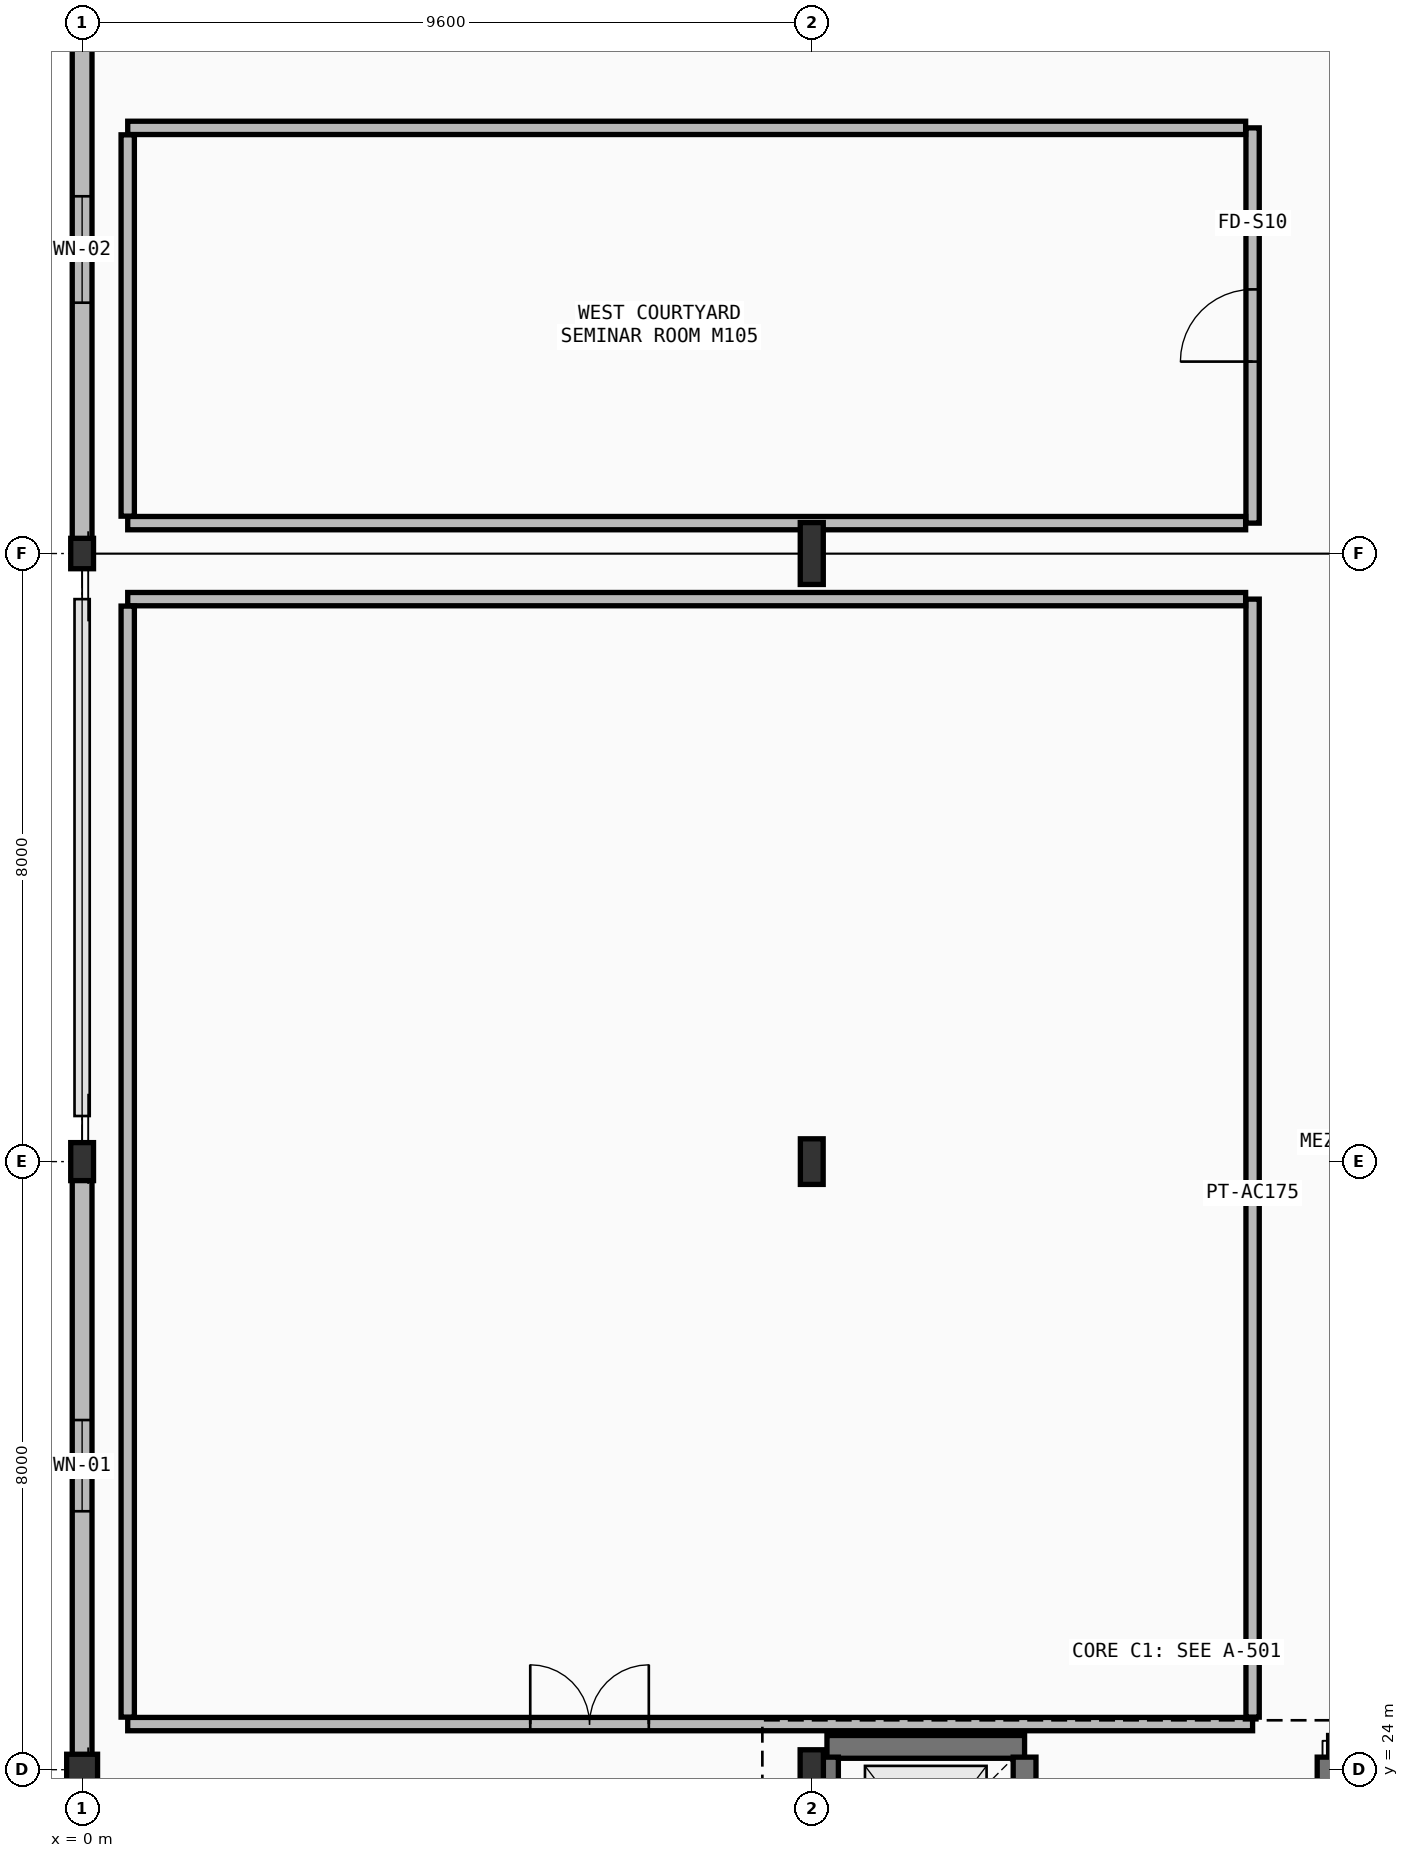
"""IFC4 building model, lengths in metres.
Left out: names, types, materials, properties, quantities, classifications, styles, units other than length and angle.
Written with IfcOpenShell. Run it as: python <this file> out.ifc"""

import sys

from ifc_helpers import new_model, si_unit, direction, frame, frame_2d, origin, origin_2d, place, context, subcontext, project, spatial, rectangle, hollow_circle, i_section, extrude, element, fill, save


model = new_model("IFC4")
c1 = context("Model", 3, precision=1e-05, world=origin(), true_north=direction((0.0, 1.0)))
c2 = subcontext(c1, "Body", "Model", "MODEL_VIEW")
j1 = project(units=[si_unit("LENGTHUNIT", "METRE"), si_unit("PLANEANGLEUNIT", "RADIAN")], contexts=[c1])
p1 = place(None, origin())
s1 = spatial("IfcSite", under=j1, at=p1, CompositionType="ELEMENT")
p2 = place(p1, origin())
s2 = spatial("IfcBuilding", under=s1, at=p2, CompositionType="ELEMENT")
p3 = place(p2, frame((0.0, 0.0, 6.0)))
s3 = spatial("IfcBuildingStorey", under=s2, at=p3, CompositionType="ELEMENT", Elevation=6.0)
p4 = place(p3, frame((0.0, 24.0, 0.0), z_axis=(0.0, 0.0, 1.0), x_axis=(1.0, 0.0, 0.0)))
e1 = element("IfcColumn", 1, at=p4, inside=s3, PredefinedType="COLUMN", context=c2, shape_type="SweptSolid", body=[
    extrude(hollow_circle(Radius=0.203, WallThickness=0.02, at=origin_2d()), origin(), (0.0, 0.0, 1.0), 5.4),
])
p5 = place(p3, frame((0.0, 32.0, 0.0), z_axis=(0.0, 0.0, 1.0), x_axis=(1.0, 0.0, 0.0)))
e2 = element("IfcColumn", 2, at=p5, inside=s3, PredefinedType="COLUMN", context=c2, shape_type="SweptSolid", body=[
    extrude(i_section(OverallWidth=0.3, OverallDepth=0.5, WebThickness=0.014, FlangeThickness=0.028, FilletRadius=0.027, at=origin_2d()), origin(), (0.0, 0.0, 1.0), 5.4),
])
p6 = place(p3, frame((0.0, 40.0, 0.0), z_axis=(0.0, 0.0, 1.0), x_axis=(1.0, 0.0, 0.0)))
e3 = element("IfcColumn", 3, at=p6, inside=s3, PredefinedType="COLUMN", context=c2, shape_type="SweptSolid", body=[
    extrude(i_section(OverallWidth=0.3, OverallDepth=0.4, WebThickness=0.013, FlangeThickness=0.024, FilletRadius=0.027, at=origin_2d()), origin(), (0.0, 0.0, 1.0), 5.4),
])
p7 = place(p3, frame((9.6, 24.0, 0.0), z_axis=(0.0, 0.0, 1.0), x_axis=(1.0, 0.0, 0.0)))
e4 = element("IfcColumn", 4, at=p7, inside=s3, PredefinedType="COLUMN", context=c2, shape_type="SweptSolid", body=[
    extrude(i_section(OverallWidth=0.306, OverallDepth=0.524, WebThickness=0.021, FlangeThickness=0.04, FilletRadius=0.027, at=origin_2d()), origin(), (0.0, 0.0, 1.0), 5.4),
])
p8 = place(p3, frame((9.6, 32.0, 0.0), z_axis=(0.0, 0.0, 1.0), x_axis=(1.0, 0.0, 0.0)))
e5 = element("IfcColumn", 5, at=p8, inside=s3, PredefinedType="COLUMN", context=c2, shape_type="SweptSolid", body=[
    extrude(i_section(OverallWidth=0.3, OverallDepth=0.6, WebThickness=0.015, FlangeThickness=0.03, FilletRadius=0.027, at=origin_2d()), origin(), (0.0, 0.0, 1.0), 5.4),
])
p9 = place(p3, frame((9.6, 40.0, 0.0), z_axis=(0.0, 0.0, 1.0), x_axis=(1.0, 0.0, 0.0)))
e6 = element("IfcColumn", 6, at=p9, inside=s3, PredefinedType="COLUMN", context=c2, shape_type="SweptSolid", body=[
    extrude(i_section(OverallWidth=0.303, OverallDepth=0.814, WebThickness=0.021, FlangeThickness=0.04, FilletRadius=0.03, at=origin_2d()), origin(), (0.0, 0.0, 1.0), 5.4),
])
p10 = place(p3, frame((0.0, 24.0, 0.0), z_axis=(0.0, 0.0, 1.0), x_axis=(0.0, 1.0, 0.0)))
e7 = element("IfcWall", 7, at=p10, inside=s3, PredefinedType="STANDARD", context=c2, shape_type="SweptSolid", body=[
    extrude(rectangle(XDim=8.0, YDim=0.26, at=frame_2d((4.0, 0.0))), origin(), (0.0, 0.0, 1.0), 4.67),
])
p11 = place(p10, frame((3.4, 0.0, 0.9)))
e8 = element("IfcOpeningElement", 8, at=p11, cuts=e7, PredefinedType="OPENING", context=c2, shape_type="SweptSolid", body=[
    extrude(rectangle(XDim=1.2, YDim=1.8, at=frame_2d((0.6, 0.9))), frame((0.0, 0.14, 0.0), z_axis=(0.0, -1.0, 0.0), x_axis=(1.0, 0.0, 0.0)), (0.0, 0.0, 1.0), 0.28),
])
p12 = place(p3, frame((0.0, 40.0, 0.0), z_axis=(0.0, 0.0, 1.0), x_axis=(0.0, 1.0, 0.0)))
e9 = element("IfcWall", 9, at=p12, inside=s3, PredefinedType="STANDARD", context=c2, shape_type="SweptSolid", body=[
    extrude(rectangle(XDim=8.0, YDim=0.26, at=frame_2d((4.0, 0.0))), origin(), (0.0, 0.0, 1.0), 4.69),
])
p13 = place(p12, frame((3.3, 0.0, 0.9)))
e10 = element("IfcOpeningElement", 10, at=p13, cuts=e9, PredefinedType="OPENING", context=c2, shape_type="SweptSolid", body=[
    extrude(rectangle(XDim=1.4, YDim=1.9, at=frame_2d((0.7, 0.95))), frame((0.0, 0.14, 0.0), z_axis=(0.0, -1.0, 0.0), x_axis=(1.0, 0.0, 0.0)), (0.0, 0.0, 1.0), 0.28),
])
p14 = place(p3, frame((12.4, 24.3, 0.0), z_axis=(0.0, 0.0, 1.0), x_axis=(-1.0, 0.0, 0.0)))
e11 = element("IfcWall", 11, at=p14, inside=s3, PredefinedType="SHEAR", context=c2, shape_type="SweptSolid", body=[
    extrude(rectangle(XDim=2.6, YDim=0.3, at=frame_2d((1.3, 0.0))), origin(), (0.0, 0.0, 1.0), 5.15),
])
p15 = place(p3, frame((12.4, 21.665, 0.0), z_axis=(0.0, 0.0, 1.0), x_axis=(0.0, 1.0, 0.0)))
e12 = element("IfcWall", 12, at=p15, inside=s3, PredefinedType="SHEAR", context=c2, shape_type="SweptSolid", body=[
    extrude(rectangle(XDim=2.5, YDim=0.3, at=frame_2d((1.25, 0.0))), origin(), (0.0, 0.0, 1.0), 5.15),
])
p16 = place(p15, frame((0.55, 0.0, 0.0)))
e13 = element("IfcOpeningElement", 13, at=p16, cuts=e12, PredefinedType="OPENING", context=c2, shape_type="SweptSolid", body=[
    extrude(rectangle(XDim=1.4, YDim=2.26, at=frame_2d((0.7, 1.13))), frame((0.0, 0.16, 0.0), z_axis=(0.0, -1.0, 0.0), x_axis=(1.0, 0.0, 0.0)), (0.0, 0.0, 1.0), 0.32),
])
p17 = place(p3, frame((9.8, 24.165, 0.0), z_axis=(0.0, 0.0, 1.0), x_axis=(0.0, -1.0, 0.0)))
e14 = element("IfcWall", 14, at=p17, inside=s3, PredefinedType="SHEAR", context=c2, shape_type="SweptSolid", body=[
    extrude(rectangle(XDim=2.33, YDim=0.3, at=frame_2d((1.165, 0.0))), origin(), (0.0, 0.0, 1.0), 5.15),
])
p18 = place(p3, frame((16.4, 24.165, 0.0), z_axis=(0.0, 0.0, 1.0), x_axis=(0.0, -1.0, 0.0)))
e15 = element("IfcWall", 15, at=p18, inside=s3, PredefinedType="SHEAR", context=c2, shape_type="SweptSolid", body=[
    extrude(rectangle(XDim=2.5, YDim=0.3, at=frame_2d((1.25, 0.0))), origin(), (0.0, 0.0, 1.0), 5.15),
])
p19 = place(p18, frame((0.65, 0.0, 0.0)))
e16 = element("IfcOpeningElement", 16, at=p19, cuts=e15, PredefinedType="OPENING", context=c2, shape_type="SweptSolid", body=[
    extrude(rectangle(XDim=1.2, YDim=2.2, at=frame_2d((0.6, 1.1))), frame((0.0, 0.16, 0.0), z_axis=(0.0, -1.0, 0.0), x_axis=(1.0, 0.0, 0.0)), (0.0, 0.0, 1.0), 0.32),
])
p20 = place(p3, frame((0.6, 24.6, 0.0), z_axis=(0.0, 0.0, 1.0), x_axis=(1.0, 0.0, 0.0)))
e17 = element("IfcWall", 17, at=p20, inside=s3, PredefinedType="PARTITIONING", context=c2, shape_type="SweptSolid", body=[
    extrude(rectangle(XDim=14.8, YDim=0.175, at=frame_2d((7.4, 0.0))), origin(), (0.0, 0.0, 1.0), 4.42),
])
p21 = place(p20, frame((5.296, 0.0, 0.0)))
e18 = element("IfcOpeningElement", 18, at=p21, cuts=e17, PredefinedType="OPENING", context=c2, shape_type="SweptSolid", body=[
    extrude(rectangle(XDim=1.56, YDim=2.18, at=frame_2d((0.78, 1.09))), frame((0.0, 0.097, 0.0), z_axis=(0.0, -1.0, 0.0), x_axis=(1.0, 0.0, 0.0)), (0.0, 0.0, 1.0), 0.195),
])
p22 = place(p3, frame((15.4, 24.691, 0.0), z_axis=(0.0, 0.0, 1.0), x_axis=(0.0, 1.0, 0.0)))
e19 = element("IfcWall", 19, at=p22, inside=s3, PredefinedType="PARTITIONING", context=c2, shape_type="SweptSolid", body=[
    extrude(rectangle(XDim=14.708, YDim=0.175, at=frame_2d((7.354, 0.0))), origin(), (0.0, 0.0, 1.0), 4.73),
])
p23 = place(p3, frame((15.309, 39.4, 0.0), z_axis=(0.0, 0.0, 1.0), x_axis=(-1.0, 0.0, 0.0)))
e20 = element("IfcWall", 20, at=p23, inside=s3, PredefinedType="PARTITIONING", context=c2, shape_type="SweptSolid", body=[
    extrude(rectangle(XDim=14.708, YDim=0.175, at=frame_2d((7.354, 0.0))), origin(), (0.0, 0.0, 1.0), 4.52),
])
p24 = place(p3, frame((0.6, 39.309, 0.0), z_axis=(0.0, 0.0, 1.0), x_axis=(0.0, -1.0, 0.0)))
e21 = element("IfcWall", 21, at=p24, inside=s3, PredefinedType="PARTITIONING", context=c2, shape_type="SweptSolid", body=[
    extrude(rectangle(XDim=14.617, YDim=0.175, at=frame_2d((7.309, 0.0))), origin(), (0.0, 0.0, 1.0), 4.63),
])
p25 = place(p3, frame((15.4, 40.4, 0.0), z_axis=(0.0, 0.0, 1.0), x_axis=(0.0, 1.0, 0.0)))
e22 = element("IfcWall", 22, at=p25, inside=s3, PredefinedType="PARTITIONING", context=c2, shape_type="SweptSolid", body=[
    extrude(rectangle(XDim=5.2, YDim=0.175, at=frame_2d((2.6, 0.0))), origin(), (0.0, 0.0, 1.0), 5.17),
])
p26 = place(p25, frame((2.125, 0.0, 0.0)))
e23 = element("IfcOpeningElement", 23, at=p26, cuts=e22, PredefinedType="OPENING", context=c2, shape_type="SweptSolid", body=[
    extrude(rectangle(XDim=0.95, YDim=2.18, at=frame_2d((0.475, 1.09))), frame((0.0, 0.097, 0.0), z_axis=(0.0, -1.0, 0.0), x_axis=(1.0, 0.0, 0.0)), (0.0, 0.0, 1.0), 0.195),
])
for number, where, z_axis, x_axis in (
    (24, (0.6, 40.4, 0.0), (0.0, 0.0, 1.0), (1.0, 0.0, 0.0)),
    (25, (15.309, 45.6, 0.0), (0.0, 0.0, 1.0), (-1.0, 0.0, 0.0)),
):
    element("IfcWall", number, at=place(p3, frame(where, z_axis=z_axis, x_axis=x_axis)), inside=s3, PredefinedType="PARTITIONING", context=c2, shape_type="SweptSolid", body=[
        extrude(rectangle(XDim=14.708, YDim=0.175, at=frame_2d((7.354, 0.0))), origin(), (0.0, 0.0, 1.0), 4.64),
    ])
p27 = place(p3, frame((0.6, 45.509, 0.0), z_axis=(0.0, 0.0, 1.0), x_axis=(0.0, -1.0, 0.0)))
e26 = element("IfcWall", 26, at=p27, inside=s3, PredefinedType="PARTITIONING", context=c2, shape_type="SweptSolid", body=[
    extrude(rectangle(XDim=5.017, YDim=0.175, at=frame_2d((2.509, 0.0))), origin(), (0.0, 0.0, 1.0), 5.17),
])
p28 = place(p11, origin())
e27 = element("IfcWindow", 27, at=p28, inside=s3, PartitioningType="SINGLE_PANEL", PredefinedType="WINDOW", context=c2, shape_type="SweptSolid", body=[
    extrude(rectangle(XDim=1.2, YDim=1.8, at=frame_2d((0.6, 0.9))), frame((0.0, 0.03, 0.0), z_axis=(0.0, -1.0, 0.0), x_axis=(1.0, 0.0, 0.0)), (0.0, 0.0, 1.0), 0.06),
])
fill(e8, e27)
p29 = place(p13, origin())
e28 = element("IfcWindow", 28, at=p29, inside=s3, PartitioningType="SINGLE_PANEL", PredefinedType="WINDOW", context=c2, shape_type="SweptSolid", body=[
    extrude(rectangle(XDim=1.4, YDim=1.9, at=frame_2d((0.7, 0.95))), frame((0.0, 0.03, 0.0), z_axis=(0.0, -1.0, 0.0), x_axis=(1.0, 0.0, 0.0)), (0.0, 0.0, 1.0), 0.06),
])
fill(e10, e28)
p30 = place(p21, origin())
e29 = element("IfcDoor", 29, at=p30, inside=s3, OperationType="DOUBLE_DOOR_SINGLE_SWING", PredefinedType="DOOR", context=c2, shape_type="SweptSolid", body=[
    extrude(rectangle(XDim=1.56, YDim=2.18, at=frame_2d((0.78, 1.09))), frame((0.0, 0.025, 0.0), z_axis=(0.0, -1.0, 0.0), x_axis=(1.0, 0.0, 0.0)), (0.0, 0.0, 1.0), 0.05),
])
fill(e18, e29)
p31 = place(p26, origin())
e30 = element("IfcDoor", 30, at=p31, inside=s3, OperationType="SINGLE_SWING_LEFT", PredefinedType="DOOR", context=c2, shape_type="SweptSolid", body=[
    extrude(rectangle(XDim=0.95, YDim=2.18, at=frame_2d((0.475, 1.09))), frame((0.0, 0.025, 0.0), z_axis=(0.0, -1.0, 0.0), x_axis=(1.0, 0.0, 0.0)), (0.0, 0.0, 1.0), 0.05),
])
fill(e23, e30)
save(model, sys.argv[1])
